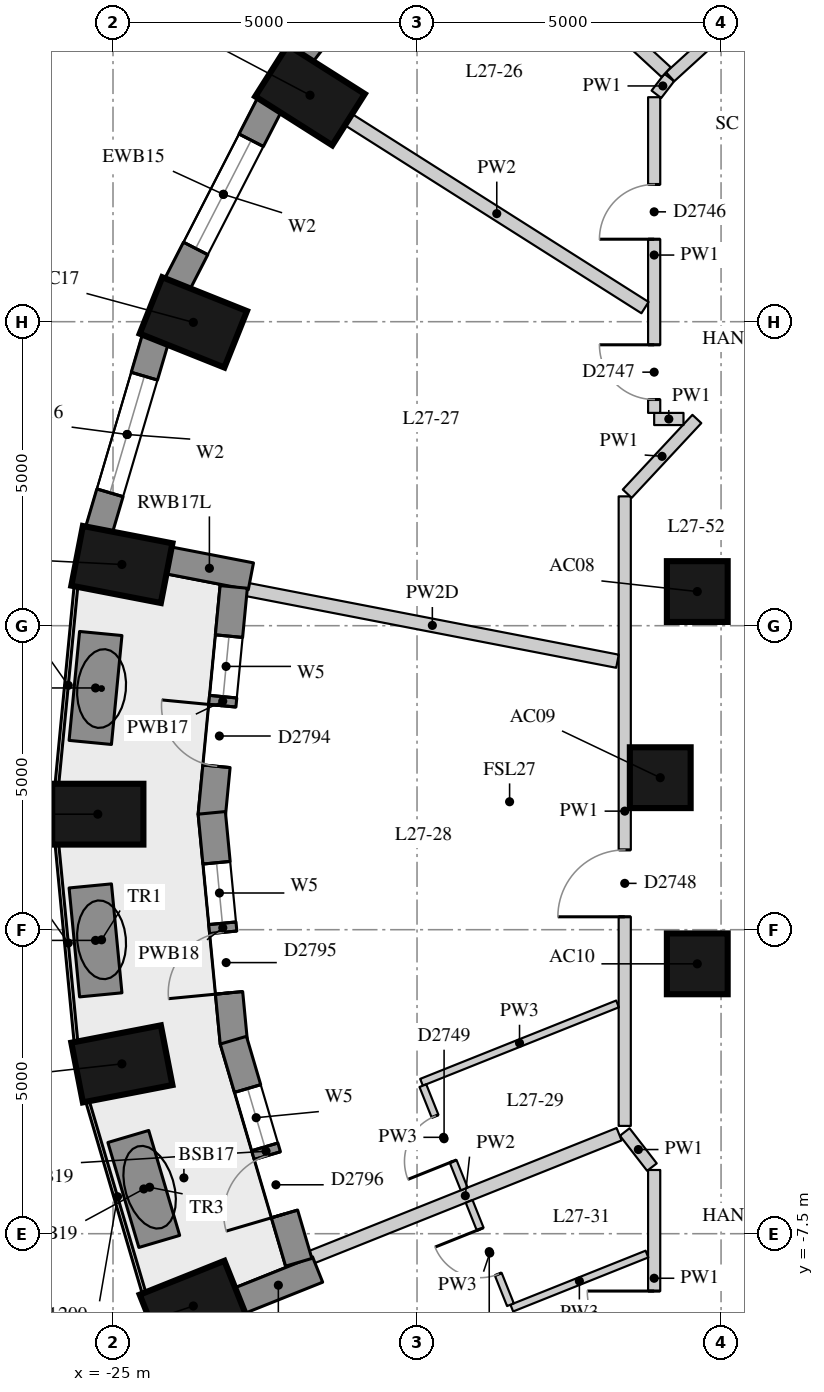
"""IFC4 building model, lengths in metres.
Left out: names, types, materials, properties, quantities, classifications, styles, units other than length and angle.
Written with IfcOpenShell. Run it as: python <this file> out.ifc"""

import sys

from ifc_helpers import new_model, si_unit, direction, frame, frame_2d, origin, origin_2d, place, context, subcontext, project, spatial, rectangle, extrude, element, fill, save


model = new_model("IFC4")
c1 = context("Model", 3, precision=1e-05, world=origin(), true_north=direction((0.0, 1.0)))
c2 = subcontext(c1, "Body", "Model", "MODEL_VIEW")
j1 = project(units=[si_unit("LENGTHUNIT", "METRE"), si_unit("PLANEANGLEUNIT", "RADIAN")], contexts=[c1])
p1 = place(None, origin())
s1 = spatial("IfcSite", under=j1, at=p1, CompositionType="ELEMENT")
p2 = place(p1, origin())
s2 = spatial("IfcBuilding", under=s1, at=p2, CompositionType="ELEMENT")
p3 = place(p2, frame((0.0, 0.0, 98.8)))
s3 = spatial("IfcBuildingStorey", under=s2, at=p3, CompositionType="ELEMENT", Elevation=98.8)
for number, where, z_axis, x_axis in (
    (1, (-21.76, 11.225, 0.0), (0.0, 0.0, 1.0), (-0.845, 0.536, 0.0)),
    (2, (-23.679, 7.489, 0.0), (0.0, 0.0, 1.0), (-0.929, 0.371, 0.0)),
    (3, (-24.854, 3.507, 0.0), (0.0, 0.0, 1.0), (-0.982, 0.19, 0.0)),
    (4, (-25.25, -0.6, 0.0), (0.0, 0.0, 1.0), (-1.0, 0.0, 0.0)),
    (5, (-24.854, -4.707, 0.0), (0.0, 0.0, 1.0), (-0.982, -0.19, 0.0)),
    (6, (-23.679, -8.689, 0.0), (0.0, 0.0, 1.0), (-0.929, -0.371, 0.0)),
):
    element("IfcColumn", number, at=place(p3, frame(where, z_axis=z_axis, x_axis=x_axis)), inside=s3, PredefinedType="COLUMN", context=c2, shape_type="SweptSolid", body=[
        extrude(rectangle(XDim=1.5, YDim=1.0, at=origin_2d()), origin(), (0.0, 0.0, 1.0), 3.3),
    ])
for number, where, z_axis, x_axis in (
    (7, (-15.391, 3.062, 0.0), (0.0, 0.0, 1.0), (1.0, 0.0, 0.0)),
    (8, (-16.0, 0.0, 0.0), (0.0, 0.0, 1.0), (1.0, 0.0, 0.0)),
    (9, (-15.391, -3.062, 0.0), (0.0, 0.0, 1.0), (1.0, 0.0, 0.0)),
):
    element("IfcColumn", number, at=place(p3, frame(where, z_axis=z_axis, x_axis=x_axis)), inside=s3, PredefinedType="COLUMN", context=c2, shape_type="SweptSolid", body=[
        extrude(rectangle(XDim=1.0, YDim=1.0, at=origin_2d()), origin(), (0.0, 0.0, 1.0), 3.3),
    ])
p4 = place(p3, frame((-19.835, 14.575, 0.0), z_axis=(0.0, 0.0, 1.0), x_axis=(-0.610693945156, -0.791866721961, 0.0)))
e10 = element("IfcWall", 10, at=p4, inside=s3, PredefinedType="SOLIDWALL", context=c2, shape_type="SweptSolid", body=[
    extrude(rectangle(XDim=3.395, YDim=0.45, at=frame_2d((1.697, 0.0))), origin(), (0.0, 0.0, 1.0), 3.02),
])
p5 = place(p4, frame((0.697, 0.0, 0.4)))
e11 = element("IfcOpeningElement", 11, at=p5, cuts=e10, PredefinedType="OPENING", context=c2, shape_type="SweptSolid", body=[
    extrude(rectangle(XDim=2.0, YDim=1.75, at=frame_2d((1.0, 0.875))), frame((0.0, 0.235, 0.0), z_axis=(0.0, -1.0, 0.0), x_axis=(1.0, 0.0, 0.0)), (0.0, 0.0, 1.0), 0.47),
])
p6 = place(p3, frame((-22.423, 11.077, 0.0), z_axis=(0.0, 0.0, 1.0), x_axis=(-0.456828186229, -0.889554949549, 0.0)))
e12 = element("IfcWall", 12, at=p6, inside=s3, PredefinedType="SOLIDWALL", context=c2, shape_type="SweptSolid", body=[
    extrude(rectangle(XDim=3.333, YDim=0.45, at=frame_2d((1.667, 0.0))), origin(), (0.0, 0.0, 1.0), 3.02),
])
p7 = place(p6, frame((0.666, 0.0, 0.4)))
e13 = element("IfcOpeningElement", 13, at=p7, cuts=e12, PredefinedType="OPENING", context=c2, shape_type="SweptSolid", body=[
    extrude(rectangle(XDim=2.0, YDim=1.75, at=frame_2d((1.0, 0.875))), frame((0.0, 0.235, 0.0), z_axis=(0.0, -1.0, 0.0), x_axis=(1.0, 0.0, 0.0)), (0.0, 0.0, 1.0), 0.47),
])
p8 = place(p3, frame((-24.302, 7.221, 0.0), z_axis=(0.0, 0.0, 1.0), x_axis=(-0.283071248438, -0.959098883488, 0.0)))
e14 = element("IfcWall", 14, at=p8, inside=s3, PredefinedType="SOLIDWALL", context=c2, shape_type="SweptSolid", body=[
    extrude(rectangle(XDim=3.286, YDim=0.45, at=frame_2d((1.643, 0.0))), origin(), (0.0, 0.0, 1.0), 3.02),
])
p9 = place(p8, frame((0.643, 0.0, 0.4)))
e15 = element("IfcOpeningElement", 15, at=p9, cuts=e14, PredefinedType="OPENING", context=c2, shape_type="SweptSolid", body=[
    extrude(rectangle(XDim=2.0, YDim=1.75, at=frame_2d((1.0, 0.875))), frame((0.0, 0.235, 0.0), z_axis=(0.0, -1.0, 0.0), x_axis=(1.0, 0.0, 0.0)), (0.0, 0.0, 1.0), 0.47),
])
p10 = place(p3, frame((-24.097, 3.576, 0.0), z_axis=(0.0, 0.0, 1.0), x_axis=(0.981777736615, -0.190032828447, 0.0)))
e16 = element("IfcWall", 16, at=p10, inside=s3, PredefinedType="SOLIDWALL", context=c2, shape_type="SweptSolid", body=[
    extrude(rectangle(XDim=1.39, YDim=0.45, at=frame_2d((0.695, 0.0))), origin(), (0.0, 0.0, 1.0), 2.47),
])
p11 = place(p3, frame((-22.926, -8.605, 0.0), z_axis=(0.0, 0.0, 1.0), x_axis=(0.928549333349, 0.371209018665, 0.0)))
e17 = element("IfcWall", 17, at=p11, inside=s3, PredefinedType="SOLIDWALL", context=c2, shape_type="SweptSolid", body=[
    extrude(rectangle(XDim=1.39, YDim=0.45, at=frame_2d((0.695, 0.0))), origin(), (0.0, 0.0, 1.0), 3.02),
])
p12 = place(p3, frame((-23.015, 3.138, 0.0), z_axis=(0.0, 0.0, 1.0), x_axis=(-0.095675452713, -0.995412581671, 0.0)))
e18 = element("IfcWall", 18, at=p12, inside=s3, PredefinedType="SOLIDWALL", context=c2, shape_type="SweptSolid", body=[
    extrude(rectangle(XDim=3.777, YDim=0.45, at=frame_2d((1.888, 0.0))), origin(), (0.0, 0.0, 1.0), 3.02),
])
p13 = place(p12, frame((0.813, 0.0, 0.4)))
e19 = element("IfcOpeningElement", 19, at=p13, cuts=e18, PredefinedType="OPENING", context=c2, shape_type="SweptSolid", body=[
    extrude(rectangle(XDim=1.0, YDim=1.75, at=frame_2d((0.5, 0.875))), frame((0.0, 0.235, 0.0), z_axis=(0.0, -1.0, 0.0), x_axis=(1.0, 0.0, 0.0)), (0.0, 0.0, 1.0), 0.47),
])
p14 = place(p12, frame((1.963, 0.0, 0.0)))
e20 = element("IfcOpeningElement", 20, at=p14, cuts=e18, PredefinedType="OPENING", context=c2, shape_type="SweptSolid", body=[
    extrude(rectangle(XDim=1.0, YDim=2.15, at=frame_2d((0.5, 1.075))), frame((0.0, 0.235, 0.0), z_axis=(0.0, -1.0, 0.0), x_axis=(1.0, 0.0, 0.0)), (0.0, 0.0, 1.0), 0.47),
])
p15 = place(p3, frame((-23.376, -0.578, 0.0), z_axis=(0.0, 0.0, 1.0), x_axis=(0.095646267275, -0.995415386437, 0.0)))
e21 = element("IfcWall", 21, at=p15, inside=s3, PredefinedType="SOLIDWALL", context=c2, shape_type="SweptSolid", body=[
    extrude(rectangle(XDim=3.798, YDim=0.45, at=frame_2d((1.899, 0.0))), origin(), (0.0, 0.0, 1.0), 3.02),
])
p16 = place(p15, frame((0.824, 0.0, 0.4)))
e22 = element("IfcOpeningElement", 22, at=p16, cuts=e21, PredefinedType="OPENING", context=c2, shape_type="SweptSolid", body=[
    extrude(rectangle(XDim=1.0, YDim=1.75, at=frame_2d((0.5, 0.875))), frame((0.0, 0.235, 0.0), z_axis=(0.0, -1.0, 0.0), x_axis=(1.0, 0.0, 0.0)), (0.0, 0.0, 1.0), 0.47),
])
p17 = place(p15, frame((1.974, 0.0, 0.0)))
e23 = element("IfcOpeningElement", 23, at=p17, cuts=e21, PredefinedType="OPENING", context=c2, shape_type="SweptSolid", body=[
    extrude(rectangle(XDim=1.0, YDim=2.15, at=frame_2d((0.5, 1.075))), frame((0.0, 0.235, 0.0), z_axis=(0.0, -1.0, 0.0), x_axis=(1.0, 0.0, 0.0)), (0.0, 0.0, 1.0), 0.47),
])
p18 = place(p3, frame((-23.021, -4.317, 0.0), z_axis=(0.0, 0.0, 1.0), x_axis=(0.282391916129, -0.959299122123, 0.0)))
e24 = element("IfcWall", 24, at=p18, inside=s3, PredefinedType="SOLIDWALL", context=c2, shape_type="SweptSolid", body=[
    extrude(rectangle(XDim=3.808, YDim=0.45, at=frame_2d((1.904, 0.0))), origin(), (0.0, 0.0, 1.0), 3.02),
])
p19 = place(p18, frame((0.829, 0.0, 0.4)))
e25 = element("IfcOpeningElement", 25, at=p19, cuts=e24, PredefinedType="OPENING", context=c2, shape_type="SweptSolid", body=[
    extrude(rectangle(XDim=1.0, YDim=1.75, at=frame_2d((0.5, 0.875))), frame((0.0, 0.235, 0.0), z_axis=(0.0, -1.0, 0.0), x_axis=(1.0, 0.0, 0.0)), (0.0, 0.0, 1.0), 0.47),
])
p20 = place(p18, frame((1.979, 0.0, 0.0)))
e26 = element("IfcOpeningElement", 26, at=p20, cuts=e24, PredefinedType="OPENING", context=c2, shape_type="SweptSolid", body=[
    extrude(rectangle(XDim=1.0, YDim=2.15, at=frame_2d((0.5, 1.075))), frame((0.0, 0.235, 0.0), z_axis=(0.0, -1.0, 0.0), x_axis=(1.0, 0.0, 0.0)), (0.0, 0.0, 1.0), 0.47),
])
p21 = place(p3, frame((-25.201, 2.372, 0.0), z_axis=(0.0, 0.0, 1.0), x_axis=(-0.0959036751, -0.995390619356, 0.0)))
e27 = element("IfcWall", 27, at=p21, inside=s3, PredefinedType="USERDEFINED", context=c2, shape_type="SweptSolid", body=[
    extrude(rectangle(XDim=1.8, YDim=0.7, at=frame_2d((0.9, 0.0))), origin(), (0.0, 0.0, 1.0), 0.75),
])
for number, where, z_axis, x_axis in (
    (28, (-25.374, -1.78, 0.0), (0.0, 0.0, 1.0), (0.096, -0.995, 0.0)),
    (29, (-24.749, -5.901, 0.0), (0.0, 0.0, 1.0), (0.283, -0.959, 0.0)),
):
    element("IfcWall", number, at=place(p3, frame(where, z_axis=z_axis, x_axis=x_axis)), inside=s3, PredefinedType="USERDEFINED", context=c2, shape_type="SweptSolid", body=[
        extrude(rectangle(XDim=1.8, YDim=0.7, at=frame_2d((0.9, 0.0))), origin(), (0.0, 0.0, 1.0), 0.75),
    ])
p22 = place(p3, frame((-16.1, -10.013, 0.0), z_axis=(0.0, 0.0, 1.0), x_axis=(0.0, 1.0, 0.0)))
e30 = element("IfcWall", 30, at=p22, inside=s3, PredefinedType="PARTITIONING", context=c2, shape_type="SweptSolid", body=[
    extrude(rectangle(XDim=3.561, YDim=0.2, at=frame_2d((1.781, 0.0))), origin(), (0.0, 0.0, 1.0), 3.02),
])
p23 = place(p22, frame((0.47, 0.0, 0.0)))
e31 = element("IfcOpeningElement", 31, at=p23, cuts=e30, PredefinedType="OPENING", context=c2, shape_type="SweptSolid", body=[
    extrude(rectangle(XDim=1.1, YDim=2.1, at=frame_2d((0.55, 1.05))), frame((0.0, 0.11, 0.0), z_axis=(0.0, -1.0, 0.0), x_axis=(1.0, 0.0, 0.0)), (0.0, 0.0, 1.0), 0.22),
])
p24 = place(p3, frame((-16.137, -6.405, 0.0), z_axis=(0.0, 0.0, 1.0), x_axis=(-0.612388914667, 0.790556650211, 0.0)))
e32 = element("IfcWall", 32, at=p24, inside=s3, PredefinedType="PARTITIONING", context=c2, shape_type="SweptSolid", body=[
    extrude(rectangle(XDim=0.73, YDim=0.2, at=frame_2d((0.365, 0.0))), origin(), (0.0, 0.0, 1.0), 3.02),
])
p25 = place(p3, frame((-16.584, -5.727, 0.0), z_axis=(0.0, 0.0, 1.0), x_axis=(0.0, 1.0, 0.0)))
e33 = element("IfcWall", 33, at=p25, inside=s3, PredefinedType="PARTITIONING", context=c2, shape_type="SweptSolid", body=[
    extrude(rectangle(XDim=10.354, YDim=0.2, at=frame_2d((5.177, 0.0))), origin(), (0.0, 0.0, 1.0), 3.02),
])
p26 = place(p25, frame((3.439, 0.0, 0.0)))
e34 = element("IfcOpeningElement", 34, at=p26, cuts=e33, PredefinedType="OPENING", context=c2, shape_type="SweptSolid", body=[
    extrude(rectangle(XDim=1.1, YDim=2.1, at=frame_2d((0.55, 1.05))), frame((0.0, 0.11, 0.0), z_axis=(0.0, -1.0, 0.0), x_axis=(1.0, 0.0, 0.0)), (0.0, 0.0, 1.0), 0.22),
])
p27 = place(p3, frame((-16.543, 4.671, 0.0), z_axis=(0.0, 0.0, 1.0), x_axis=(0.681815766934, 0.731523929861, 0.0)))
e35 = element("IfcWall", 35, at=p27, inside=s3, PredefinedType="PARTITIONING", context=c2, shape_type="SweptSolid", body=[
    extrude(rectangle(XDim=1.68, YDim=0.2, at=frame_2d((0.84, 0.0))), origin(), (0.0, 0.0, 1.0), 3.02),
])
p28 = place(p3, frame((-15.618, 5.9, 0.0), z_axis=(0.0, 0.0, 1.0), x_axis=(-1.0, 0.0, 0.0)))
e36 = element("IfcWall", 36, at=p28, inside=s3, PredefinedType="PARTITIONING", context=c2, shape_type="SweptSolid", body=[
    extrude(rectangle(XDim=0.482, YDim=0.2, at=frame_2d((0.241, 0.0))), origin(), (0.0, 0.0, 1.0), 3.02),
])
p29 = place(p3, frame((-16.1, 6.0, 0.0), z_axis=(0.0, 0.0, 1.0), x_axis=(0.0, 1.0, 0.0)))
e37 = element("IfcWall", 37, at=p29, inside=s3, PredefinedType="PARTITIONING", context=c2, shape_type="SweptSolid", body=[
    extrude(rectangle(XDim=5.192, YDim=0.2, at=frame_2d((2.596, 0.0))), origin(), (0.0, 0.0, 1.0), 3.02),
])
p30 = place(p29, frame((2.857, 0.0, 0.0)))
e38 = element("IfcOpeningElement", 38, at=p30, cuts=e37, PredefinedType="OPENING", context=c2, shape_type="SweptSolid", body=[
    extrude(rectangle(XDim=0.9, YDim=2.1, at=frame_2d((0.45, 1.05))), frame((0.0, 0.11, 0.0), z_axis=(0.0, -1.0, 0.0), x_axis=(1.0, 0.0, 0.0)), (0.0, 0.0, 1.0), 0.22),
])
p31 = place(p29, frame((0.22, 0.0, 0.0)))
e39 = element("IfcOpeningElement", 39, at=p31, cuts=e37, PredefinedType="OPENING", context=c2, shape_type="SweptSolid", body=[
    extrude(rectangle(XDim=0.9, YDim=2.1, at=frame_2d((0.45, 1.05))), frame((0.0, 0.11, 0.0), z_axis=(0.0, -1.0, 0.0), x_axis=(1.0, 0.0, 0.0)), (0.0, 0.0, 1.0), 0.22),
])
p32 = place(p3, frame((-16.063, 11.24, 0.0), z_axis=(0.0, 0.0, 1.0), x_axis=(0.609744747854, 0.792597844096, 0.0)))
e40 = element("IfcWall", 40, at=p32, inside=s3, PredefinedType="PARTITIONING", context=c2, shape_type="SweptSolid", body=[
    extrude(rectangle(XDim=0.347, YDim=0.2, at=frame_2d((0.174, 0.0))), origin(), (0.0, 0.0, 1.0), 3.02),
])
p33 = place(p3, frame((-15.837, 11.528, 0.0), z_axis=(0.0, 0.0, 1.0), x_axis=(0.739402681643, 0.673263450946, 0.0)))
e41 = element("IfcWall", 41, at=p33, inside=s3, PredefinedType="PARTITIONING", context=c2, shape_type="SweptSolid", body=[
    extrude(rectangle(XDim=1.728, YDim=0.2, at=frame_2d((0.864, 0.0))), origin(), (0.0, 0.0, 1.0), 3.02),
])
p34 = place(p3, frame((-18.604, 14.094, 0.0), z_axis=(0.0, 0.0, 1.0), x_axis=(0.73529495628, -0.677747244383, 0.0)))
e42 = element("IfcWall", 42, at=p34, inside=s3, PredefinedType="PARTITIONING", context=c2, shape_type="SweptSolid", body=[
    extrude(rectangle(XDim=3.674, YDim=0.22, at=frame_2d((1.837, 0.0))), origin(), (0.0, 0.0, 1.0), 3.02),
])
p35 = place(p3, frame((-21.126, 10.823, 0.0), z_axis=(0.0, 0.0, 1.0), x_axis=(0.844518840625, -0.535525842355, 0.0)))
e43 = element("IfcWall", 43, at=p35, inside=s3, PredefinedType="PARTITIONING", context=c2, shape_type="SweptSolid", body=[
    extrude(rectangle(XDim=5.773, YDim=0.22, at=frame_2d((2.887, 0.0))), origin(), (0.0, 0.0, 1.0), 3.02),
])
p36 = place(p3, frame((-22.793, 3.095, 0.0), z_axis=(0.0, 0.0, 1.0), x_axis=(0.98175994641, -0.190124715976, 0.0)))
e44 = element("IfcWall", 44, at=p36, inside=s3, PredefinedType="PARTITIONING", context=c2, shape_type="SweptSolid", body=[
    extrude(rectangle(XDim=6.202, YDim=0.22, at=frame_2d((3.101, 0.0))), origin(), (0.0, 0.0, 1.0), 2.47),
])
p37 = place(p3, frame((-21.736, -7.887, 0.0), z_axis=(0.0, 0.0, 1.0), x_axis=(0.928513770625, 0.371297963583, 0.0)))
e45 = element("IfcWall", 45, at=p37, inside=s3, PredefinedType="PARTITIONING", context=c2, shape_type="SweptSolid", body=[
    extrude(rectangle(XDim=5.448, YDim=0.22, at=frame_2d((2.724, 0.0))), origin(), (0.0, 0.0, 1.0), 3.02),
])
p38 = place(p3, frame((-16.703, -3.721, 0.0), z_axis=(0.0, 0.0, 1.0), x_axis=(-0.928539725362, -0.371233051362, 0.0)))
e46 = element("IfcWall", 46, at=p38, inside=s3, PredefinedType="PARTITIONING", context=c2, shape_type="SweptSolid", body=[
    extrude(rectangle(XDim=3.472, YDim=0.12, at=frame_2d((1.736, 0.0))), origin(), (0.0, 0.0, 1.0), 3.02),
])
p39 = place(p3, frame((-16.219, -7.835, 0.0), z_axis=(0.0, 0.0, 1.0), x_axis=(-0.928532951542, -0.371249993806, 0.0)))
e47 = element("IfcWall", 47, at=p39, inside=s3, PredefinedType="PARTITIONING", context=c2, shape_type="SweptSolid", body=[
    extrude(rectangle(XDim=2.394, YDim=0.12, at=frame_2d((1.197, 0.0))), origin(), (0.0, 0.0, 1.0), 3.02),
])
p40 = place(p3, frame((-19.904, -5.065, 0.0), z_axis=(0.0, 0.0, 1.0), x_axis=(0.371275666236, -0.92852268667, 0.0)))
e48 = element("IfcWall", 48, at=p40, inside=s3, PredefinedType="PARTITIONING", context=c2, shape_type="SweptSolid", body=[
    extrude(rectangle(XDim=1.83, YDim=0.12, at=frame_2d((0.915, 0.0))), origin(), (0.0, 0.0, 1.0), 3.02),
])
p41 = place(p40, frame((0.54, 0.0, 0.0)))
e49 = element("IfcOpeningElement", 49, at=p41, cuts=e48, PredefinedType="OPENING", context=c2, shape_type="SweptSolid", body=[
    extrude(rectangle(XDim=0.8, YDim=2.1, at=frame_2d((0.4, 1.05))), frame((0.0, 0.07, 0.0), z_axis=(0.0, -1.0, 0.0), x_axis=(1.0, 0.0, 0.0)), (0.0, 0.0, 1.0), 0.14),
])
p42 = place(p3, frame((-18.464, -8.668, 0.0), z_axis=(0.0, 0.0, 1.0), x_axis=(-0.371275666236, 0.92852268667, 0.0)))
e50 = element("IfcWall", 50, at=p42, inside=s3, PredefinedType="PARTITIONING", context=c2, shape_type="SweptSolid", body=[
    extrude(rectangle(XDim=1.83, YDim=0.12, at=frame_2d((0.915, 0.0))), origin(), (0.0, 0.0, 1.0), 3.02),
])
p43 = place(p42, frame((0.54, 0.0, 0.0)))
e51 = element("IfcOpeningElement", 51, at=p43, cuts=e50, PredefinedType="OPENING", context=c2, shape_type="SweptSolid", body=[
    extrude(rectangle(XDim=0.8, YDim=2.1, at=frame_2d((0.4, 1.05))), frame((0.0, 0.07, 0.0), z_axis=(0.0, -1.0, 0.0), x_axis=(1.0, 0.0, 0.0)), (0.0, 0.0, 1.0), 0.14),
])
p44 = place(p7, origin())
e52 = element("IfcWindow", 52, at=p44, inside=s3, PartitioningType="SINGLE_PANEL", PredefinedType="WINDOW", context=c2, shape_type="SweptSolid", body=[
    extrude(rectangle(XDim=2.0, YDim=1.75, at=frame_2d((1.0, 0.875))), frame((0.0, 0.035, 0.0), z_axis=(0.0, -1.0, 0.0), x_axis=(1.0, 0.0, 0.0)), (0.0, 0.0, 1.0), 0.06),
])
fill(e13, e52)
p45 = place(p9, origin())
e53 = element("IfcWindow", 53, at=p45, inside=s3, PartitioningType="SINGLE_PANEL", PredefinedType="WINDOW", context=c2, shape_type="SweptSolid", body=[
    extrude(rectangle(XDim=2.0, YDim=1.75, at=frame_2d((1.0, 0.875))), frame((0.0, 0.035, 0.0), z_axis=(0.0, -1.0, 0.0), x_axis=(1.0, 0.0, 0.0)), (0.0, 0.0, 1.0), 0.06),
])
fill(e15, e53)
p46 = place(p13, origin())
e54 = element("IfcWindow", 54, at=p46, inside=s3, PartitioningType="SINGLE_PANEL", PredefinedType="WINDOW", context=c2, shape_type="SweptSolid", body=[
    extrude(rectangle(XDim=1.0, YDim=1.75, at=frame_2d((0.5, 0.875))), frame((0.0, 0.035, 0.0), z_axis=(0.0, -1.0, 0.0), x_axis=(1.0, 0.0, 0.0)), (0.0, 0.0, 1.0), 0.06),
])
fill(e19, e54)
p47 = place(p14, frame((1.0, 0.0, 0.0), z_axis=(0.0, 0.0, 1.0), x_axis=(-1.0, 0.0, 0.0)))
e55 = element("IfcDoor", 55, at=p47, inside=s3, OperationType="SINGLE_SWING_RIGHT", PredefinedType="DOOR", context=c2, shape_type="SweptSolid", body=[
    extrude(rectangle(XDim=1.0, YDim=2.15, at=frame_2d((0.5, 1.075))), frame((0.0, 0.075, 0.0), z_axis=(0.0, -1.0, 0.0), x_axis=(1.0, 0.0, 0.0)), (0.0, 0.0, 1.0), 0.05),
])
fill(e20, e55)
p48 = place(p16, origin())
e56 = element("IfcWindow", 56, at=p48, inside=s3, PartitioningType="SINGLE_PANEL", PredefinedType="WINDOW", context=c2, shape_type="SweptSolid", body=[
    extrude(rectangle(XDim=1.0, YDim=1.75, at=frame_2d((0.5, 0.875))), frame((0.0, 0.035, 0.0), z_axis=(0.0, -1.0, 0.0), x_axis=(1.0, 0.0, 0.0)), (0.0, 0.0, 1.0), 0.06),
])
fill(e22, e56)
p49 = place(p17, frame((1.0, 0.0, 0.0), z_axis=(0.0, 0.0, 1.0), x_axis=(-1.0, 0.0, 0.0)))
e57 = element("IfcDoor", 57, at=p49, inside=s3, OperationType="SINGLE_SWING_LEFT", PredefinedType="DOOR", context=c2, shape_type="SweptSolid", body=[
    extrude(rectangle(XDim=1.0, YDim=2.15, at=frame_2d((0.5, 1.075))), frame((0.0, 0.075, 0.0), z_axis=(0.0, -1.0, 0.0), x_axis=(1.0, 0.0, 0.0)), (0.0, 0.0, 1.0), 0.05),
])
fill(e23, e57)
p50 = place(p19, origin())
e58 = element("IfcWindow", 58, at=p50, inside=s3, PartitioningType="SINGLE_PANEL", PredefinedType="WINDOW", context=c2, shape_type="SweptSolid", body=[
    extrude(rectangle(XDim=1.0, YDim=1.75, at=frame_2d((0.5, 0.875))), frame((0.0, 0.035, 0.0), z_axis=(0.0, -1.0, 0.0), x_axis=(1.0, 0.0, 0.0)), (0.0, 0.0, 1.0), 0.06),
])
fill(e25, e58)
p51 = place(p20, frame((1.0, 0.0, 0.0), z_axis=(0.0, 0.0, 1.0), x_axis=(-1.0, 0.0, 0.0)))
e59 = element("IfcDoor", 59, at=p51, inside=s3, OperationType="SINGLE_SWING_LEFT", PredefinedType="DOOR", context=c2, shape_type="SweptSolid", body=[
    extrude(rectangle(XDim=1.0, YDim=2.15, at=frame_2d((0.5, 1.075))), frame((0.0, 0.075, 0.0), z_axis=(0.0, -1.0, 0.0), x_axis=(1.0, 0.0, 0.0)), (0.0, 0.0, 1.0), 0.05),
])
fill(e26, e59)
p52 = place(p30, origin())
e60 = element("IfcDoor", 60, at=p52, inside=s3, OperationType="SINGLE_SWING_LEFT", PredefinedType="DOOR", context=c2, shape_type="SweptSolid", body=[
    extrude(rectangle(XDim=0.9, YDim=2.1, at=frame_2d((0.45, 1.05))), frame((0.0, 0.025, 0.0), z_axis=(0.0, -1.0, 0.0), x_axis=(1.0, 0.0, 0.0)), (0.0, 0.0, 1.0), 0.05),
])
fill(e38, e60)
p53 = place(p31, origin())
e61 = element("IfcDoor", 61, at=p53, inside=s3, OperationType="SINGLE_SWING_RIGHT", PredefinedType="DOOR", context=c2, shape_type="SweptSolid", body=[
    extrude(rectangle(XDim=0.9, YDim=2.1, at=frame_2d((0.45, 1.05))), frame((0.0, 0.025, 0.0), z_axis=(0.0, -1.0, 0.0), x_axis=(1.0, 0.0, 0.0)), (0.0, 0.0, 1.0), 0.05),
])
fill(e39, e61)
p54 = place(p26, origin())
e62 = element("IfcDoor", 62, at=p54, inside=s3, OperationType="SINGLE_SWING_LEFT", PredefinedType="DOOR", context=c2, shape_type="SweptSolid", body=[
    extrude(rectangle(XDim=1.1, YDim=2.1, at=frame_2d((0.55, 1.05))), frame((0.0, 0.025, 0.0), z_axis=(0.0, -1.0, 0.0), x_axis=(1.0, 0.0, 0.0)), (0.0, 0.0, 1.0), 0.05),
])
fill(e34, e62)
p55 = place(p41, origin())
e63 = element("IfcDoor", 63, at=p55, inside=s3, OperationType="SINGLE_SWING_LEFT", PredefinedType="DOOR", context=c2, shape_type="SweptSolid", body=[
    extrude(rectangle(XDim=0.8, YDim=2.1, at=frame_2d((0.4, 1.05))), frame((0.0, 0.025, 0.0), z_axis=(0.0, -1.0, 0.0), x_axis=(1.0, 0.0, 0.0)), (0.0, 0.0, 1.0), 0.05),
])
fill(e49, e63)
p56 = place(p23, origin())
e64 = element("IfcDoor", 64, at=p56, inside=s3, OperationType="SINGLE_SWING_RIGHT", PredefinedType="DOOR", context=c2, shape_type="SweptSolid", body=[
    extrude(rectangle(XDim=1.1, YDim=2.1, at=frame_2d((0.55, 1.05))), frame((0.0, 0.025, 0.0), z_axis=(0.0, -1.0, 0.0), x_axis=(1.0, 0.0, 0.0)), (0.0, 0.0, 1.0), 0.05),
])
fill(e31, e64)
p57 = place(p43, origin())
e65 = element("IfcDoor", 65, at=p57, inside=s3, OperationType="SINGLE_SWING_RIGHT", PredefinedType="DOOR", context=c2, shape_type="SweptSolid", body=[
    extrude(rectangle(XDim=0.8, YDim=2.1, at=frame_2d((0.4, 1.05))), frame((0.0, 0.025, 0.0), z_axis=(0.0, -1.0, 0.0), x_axis=(1.0, 0.0, 0.0)), (0.0, 0.0, 1.0), 0.05),
])
fill(e51, e65)
save(model, sys.argv[1])
